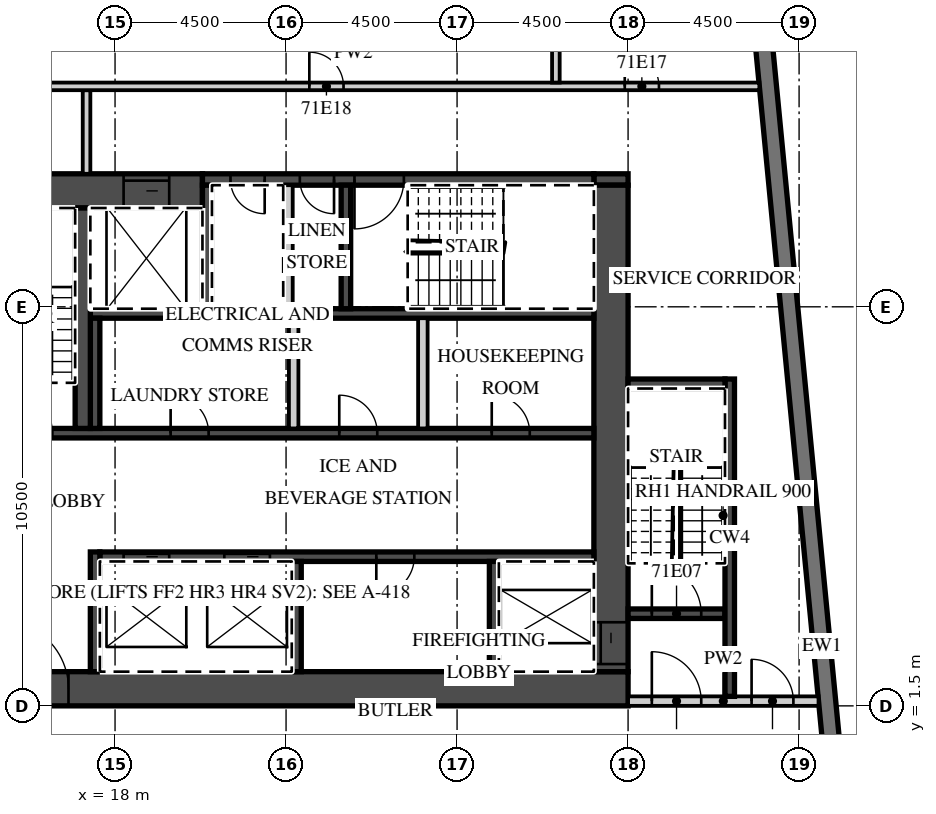
"""IFC4 building model, lengths in metres.
Left out: names, types, materials, properties, quantities, classifications, styles, units other than length and angle.
Written with IfcOpenShell. Run it as: python <this file> out.ifc"""

import sys

from ifc_helpers import new_model, si_unit, direction, frame, frame_2d, origin, place, context, subcontext, project, spatial, rectangle, extrude, element, fill, save


model = new_model("IFC4")
c1 = context("Model", 3, precision=1e-05, world=origin(), true_north=direction((0.0, 1.0)))
c2 = subcontext(c1, "Body", "Model", "MODEL_VIEW")
j1 = project(units=[si_unit("LENGTHUNIT", "METRE"), si_unit("PLANEANGLEUNIT", "RADIAN")], contexts=[c1])
p1 = place(None, origin())
s1 = spatial("IfcSite", under=j1, at=p1, CompositionType="ELEMENT")
p2 = place(p1, origin())
s2 = spatial("IfcBuilding", under=s1, at=p2, CompositionType="ELEMENT")
p3 = place(p2, frame((0.0, 0.0, 285.0)))
s3 = spatial("IfcBuildingStorey", under=s2, at=p3, CompositionType="ELEMENT", Elevation=285.0)
p4 = place(p3, frame((38.132, -12.858, 0.0), z_axis=(0.0, 0.0, 1.0), x_axis=(-0.095847749461, 0.995396006082, 0.0)))
e1 = element("IfcWall", 1, at=p4, inside=s3, PredefinedType="SOLIDWALL", context=c2, shape_type="SweptSolid", body=[
    extrude(rectangle(XDim=32.0, YDim=0.45, at=frame_2d((16.0, 0.0))), origin(), (0.0, 0.0, 1.0), 3.02),
])
p5 = place(p3, frame((13.5, 1.95, 0.0), z_axis=(0.0, 0.0, 1.0), x_axis=(1.0, 0.0, 0.0)))
e2 = element("IfcWall", 2, at=p5, inside=s3, PredefinedType="SHEAR", context=c2, shape_type="SweptSolid", body=[
    extrude(rectangle(XDim=18.0, YDim=0.9, at=frame_2d((9.0, 0.0))), origin(), (0.0, 0.0, 1.0), 3.02),
])
p6 = place(p5, frame((1.475, 0.0, 0.0)))
e3 = element("IfcOpeningElement", 3, at=p6, cuts=e2, PredefinedType="OPENING", context=c2, shape_type="SweptSolid", body=[
    extrude(rectangle(XDim=1.8, YDim=2.1, at=frame_2d((0.9, 1.05))), frame((0.0, 0.46, 0.0), z_axis=(0.0, -1.0, 0.0), x_axis=(1.0, 0.0, 0.0)), (0.0, 0.0, 1.0), 0.92),
])
p7 = place(p3, frame((13.5, 15.05, 0.0), z_axis=(0.0, 0.0, 1.0), x_axis=(1.0, 0.0, 0.0)))
e4 = element("IfcWall", 4, at=p7, inside=s3, PredefinedType="SHEAR", context=c2, shape_type="SweptSolid", body=[
    extrude(rectangle(XDim=6.8, YDim=0.9, at=frame_2d((3.4, 0.0))), origin(), (0.0, 0.0, 1.0), 3.02),
])
p8 = place(p7, frame((4.725, 0.0, 0.0)))
e5 = element("IfcOpeningElement", 5, at=p8, cuts=e4, PredefinedType="OPENING", context=c2, shape_type="SweptSolid", body=[
    extrude(rectangle(XDim=1.2, YDim=2.1, at=frame_2d((0.6, 1.05))), frame((0.0, 0.46, 0.0), z_axis=(0.0, -1.0, 0.0), x_axis=(1.0, 0.0, 0.0)), (0.0, 0.0, 1.0), 0.92),
])
p9 = place(p3, frame((30.6, 15.35, 0.0), z_axis=(0.0, 0.0, 1.0), x_axis=(1.0, 0.0, 0.0)))
e6 = element("IfcWall", 6, at=p9, inside=s3, PredefinedType="SHEAR", context=c2, shape_type="SweptSolid", body=[
    extrude(rectangle(XDim=0.9, YDim=0.3, at=frame_2d((0.45, 0.0))), origin(), (0.0, 0.0, 1.0), 3.02),
])
p10 = place(p3, frame((20.3, 15.35, 0.0), z_axis=(0.0, 0.0, 1.0), x_axis=(1.0, 0.0, 0.0)))
e7 = element("IfcWall", 7, at=p10, inside=s3, PredefinedType="SHEAR", context=c2, shape_type="SweptSolid", body=[
    extrude(rectangle(XDim=10.3, YDim=0.3, at=frame_2d((5.15, 0.0))), origin(), (0.0, 0.0, 1.0), 3.02),
])
p11 = place(p10, frame((4.0, 0.0, 0.0)))
e8 = element("IfcOpeningElement", 8, at=p11, cuts=e7, PredefinedType="OPENING", context=c2, shape_type="SweptSolid", body=[
    extrude(rectangle(XDim=1.3, YDim=2.1, at=frame_2d((0.65, 1.05))), frame((0.0, 0.16, 0.0), z_axis=(0.0, -1.0, 0.0), x_axis=(1.0, 0.0, 0.0)), (0.0, 0.0, 1.0), 0.32),
])
p12 = place(p10, frame((2.562, 0.0, 0.0)))
e9 = element("IfcOpeningElement", 9, at=p12, cuts=e7, PredefinedType="OPENING", context=c2, shape_type="SweptSolid", body=[
    extrude(rectangle(XDim=0.9, YDim=2.1, at=frame_2d((0.45, 1.05))), frame((0.0, 0.16, 0.0), z_axis=(0.0, -1.0, 0.0), x_axis=(1.0, 0.0, 0.0)), (0.0, 0.0, 1.0), 0.32),
])
p13 = place(p10, frame((0.738, 0.0, 0.0)))
e10 = element("IfcOpeningElement", 10, at=p13, cuts=e7, PredefinedType="OPENING", context=c2, shape_type="SweptSolid", body=[
    extrude(rectangle(XDim=0.9, YDim=2.1, at=frame_2d((0.45, 1.05))), frame((0.0, 0.16, 0.0), z_axis=(0.0, -1.0, 0.0), x_axis=(1.0, 0.0, 0.0)), (0.0, 0.0, 1.0), 0.32),
])
p14 = place(p3, frame((31.05, 2.4, 0.0), z_axis=(0.0, 0.0, 1.0), x_axis=(0.0, 1.0, 0.0)))
e11 = element("IfcWall", 11, at=p14, inside=s3, PredefinedType="SHEAR", context=c2, shape_type="SweptSolid", body=[
    extrude(rectangle(XDim=12.8, YDim=0.9, at=frame_2d((6.4, 0.0))), origin(), (0.0, 0.0, 1.0), 3.02),
])
p15 = place(p14, frame((0.2, 0.0, 0.0)))
e12 = element("IfcOpeningElement", 12, at=p15, cuts=e11, PredefinedType="OPENING", context=c2, shape_type="SweptSolid", body=[
    extrude(rectangle(XDim=1.1, YDim=2.1, at=frame_2d((0.55, 1.05))), frame((0.0, 0.46, 0.0), z_axis=(0.0, -1.0, 0.0), x_axis=(1.0, 0.0, 0.0)), (0.0, 0.0, 1.0), 0.92),
])
p16 = place(p3, frame((17.6, 5.425, 0.0), z_axis=(0.0, 0.0, 1.0), x_axis=(1.0, 0.0, 0.0)))
e13 = element("IfcWall", 13, at=p16, inside=s3, PredefinedType="SHEAR", context=c2, shape_type="SweptSolid", body=[
    extrude(rectangle(XDim=13.0, YDim=0.25, at=frame_2d((6.5, 0.0))), origin(), (0.0, 0.0, 1.0), 3.02),
])
p17 = place(p16, frame((3.275, 0.0, 0.0)))
e14 = element("IfcOpeningElement", 14, at=p17, cuts=e13, PredefinedType="OPENING", context=c2, shape_type="SweptSolid", body=[
    extrude(rectangle(XDim=1.2, YDim=2.1, at=frame_2d((0.6, 1.05))), frame((0.0, 0.135, 0.0), z_axis=(0.0, -1.0, 0.0), x_axis=(1.0, 0.0, 0.0)), (0.0, 0.0, 1.0), 0.27),
])
p18 = place(p16, frame((0.625, 0.0, 0.0)))
e15 = element("IfcOpeningElement", 15, at=p18, cuts=e13, PredefinedType="OPENING", context=c2, shape_type="SweptSolid", body=[
    extrude(rectangle(XDim=1.2, YDim=2.1, at=frame_2d((0.6, 1.05))), frame((0.0, 0.135, 0.0), z_axis=(0.0, -1.0, 0.0), x_axis=(1.0, 0.0, 0.0)), (0.0, 0.0, 1.0), 0.27),
])
p19 = place(p16, frame((7.275, 0.0, 0.0)))
e16 = element("IfcOpeningElement", 16, at=p19, cuts=e13, PredefinedType="OPENING", context=c2, shape_type="SweptSolid", body=[
    extrude(rectangle(XDim=1.0, YDim=2.1, at=frame_2d((0.5, 1.05))), frame((0.0, 0.135, 0.0), z_axis=(0.0, -1.0, 0.0), x_axis=(1.0, 0.0, 0.0)), (0.0, 0.0, 1.0), 0.27),
])
p20 = place(p3, frame((17.475, 2.4, 0.0), z_axis=(0.0, 0.0, 1.0), x_axis=(0.0, 1.0, 0.0)))
e17 = element("IfcWall", 17, at=p20, inside=s3, PredefinedType="SHEAR", context=c2, shape_type="SweptSolid", body=[
    extrude(rectangle(XDim=3.15, YDim=0.25, at=frame_2d((1.575, 0.0))), origin(), (0.0, 0.0, 1.0), 3.02),
])
for number, where, z_axis, x_axis in (
    (18, (27.975, 2.4, 0.0), (0.0, 0.0, 1.0), (0.0, 1.0, 0.0)),
    (19, (22.775, 2.4, 0.0), (0.0, 0.0, 1.0), (0.0, 1.0, 0.0)),
):
    element("IfcWall", number, at=place(p3, frame(where, z_axis=z_axis, x_axis=x_axis)), inside=s3, PredefinedType="SHEAR", context=c2, shape_type="SweptSolid", body=[
        extrude(rectangle(XDim=2.9, YDim=0.25, at=frame_2d((1.45, 0.0))), origin(), (0.0, 0.0, 1.0), 3.02),
    ])
p21 = place(p3, frame((14.4, 8.675, 0.0), z_axis=(0.0, 0.0, 1.0), x_axis=(1.0, 0.0, 0.0)))
e20 = element("IfcWall", 20, at=p21, inside=s3, PredefinedType="SHEAR", context=c2, shape_type="SweptSolid", body=[
    extrude(rectangle(XDim=16.2, YDim=0.25, at=frame_2d((8.1, 0.0))), origin(), (0.0, 0.0, 1.0), 3.02),
])
p22 = place(p21, frame((0.65, 0.0, 0.0)))
e21 = element("IfcOpeningElement", 21, at=p22, cuts=e20, PredefinedType="OPENING", context=c2, shape_type="SweptSolid", body=[
    extrude(rectangle(XDim=1.3, YDim=2.1, at=frame_2d((0.65, 1.05))), frame((0.0, 0.135, 0.0), z_axis=(0.0, -1.0, 0.0), x_axis=(1.0, 0.0, 0.0)), (0.0, 0.0, 1.0), 0.27),
])
p23 = place(p21, frame((13.512, 0.0, 0.0)))
e22 = element("IfcOpeningElement", 22, at=p23, cuts=e20, PredefinedType="OPENING", context=c2, shape_type="SweptSolid", body=[
    extrude(rectangle(XDim=1.0, YDim=2.1, at=frame_2d((0.5, 1.05))), frame((0.0, 0.135, 0.0), z_axis=(0.0, -1.0, 0.0), x_axis=(1.0, 0.0, 0.0)), (0.0, 0.0, 1.0), 0.27),
])
p24 = place(p21, frame((9.5, 0.0, 0.0)))
e23 = element("IfcOpeningElement", 23, at=p24, cuts=e20, PredefinedType="OPENING", context=c2, shape_type="SweptSolid", body=[
    extrude(rectangle(XDim=1.0, YDim=2.1, at=frame_2d((0.5, 1.05))), frame((0.0, 0.135, 0.0), z_axis=(0.0, -1.0, 0.0), x_axis=(1.0, 0.0, 0.0)), (0.0, 0.0, 1.0), 0.27),
])
p25 = place(p21, frame((5.062, 0.0, 0.0)))
e24 = element("IfcOpeningElement", 24, at=p25, cuts=e20, PredefinedType="OPENING", context=c2, shape_type="SweptSolid", body=[
    extrude(rectangle(XDim=1.0, YDim=2.1, at=frame_2d((0.5, 1.05))), frame((0.0, 0.135, 0.0), z_axis=(0.0, -1.0, 0.0), x_axis=(1.0, 0.0, 0.0)), (0.0, 0.0, 1.0), 0.27),
])
p26 = place(p3, frame((17.35, 11.825, 0.0), z_axis=(0.0, 0.0, 1.0), x_axis=(1.0, 0.0, 0.0)))
e25 = element("IfcWall", 25, at=p26, inside=s3, PredefinedType="SHEAR", context=c2, shape_type="SweptSolid", body=[
    extrude(rectangle(XDim=13.25, YDim=0.25, at=frame_2d((6.625, 0.0))), origin(), (0.0, 0.0, 1.0), 3.02),
])
p27 = place(p3, frame((17.475, 8.8, 0.0), z_axis=(0.0, 0.0, 1.0), x_axis=(0.0, 1.0, 0.0)))
e26 = element("IfcWall", 26, at=p27, inside=s3, PredefinedType="SHEAR", context=c2, shape_type="SweptSolid", body=[
    extrude(rectangle(XDim=2.9, YDim=0.25, at=frame_2d((1.45, 0.0))), origin(), (0.0, 0.0, 1.0), 3.02),
])
for number, where, z_axis, x_axis in (
    (27, (26.1, 8.8, 0.0), (0.0, 0.0, 1.0), (0.0, 1.0, 0.0)),
    (28, (22.7, 8.8, 0.0), (0.0, 0.0, 1.0), (0.0, 1.0, 0.0)),
):
    element("IfcWall", number, at=place(p3, frame(where, z_axis=z_axis, x_axis=x_axis)), inside=s3, PredefinedType="PARTITIONING", context=c2, shape_type="SweptSolid", body=[
        extrude(rectangle(XDim=2.9, YDim=0.25, at=frame_2d((1.45, 0.0))), origin(), (0.0, 0.0, 1.0), 3.02),
    ])
p28 = place(p3, frame((17.15, 8.8, 0.0), z_axis=(0.0, 0.0, 1.0), x_axis=(0.0, 1.0, 0.0)))
e29 = element("IfcWall", 29, at=p28, inside=s3, PredefinedType="SHEAR", context=c2, shape_type="SweptSolid", body=[
    extrude(rectangle(XDim=5.8, YDim=0.4, at=frame_2d((2.9, 0.0))), origin(), (0.0, 0.0, 1.0), 3.02),
])
for number, where, z_axis, x_axis in (
    (30, (20.425, 11.95, 0.0), (0.0, 0.0, 1.0), (0.0, 1.0, 0.0)),
    (31, (24.075, 11.95, 0.0), (0.0, 0.0, 1.0), (0.0, 1.0, 0.0)),
):
    element("IfcWall", number, at=place(p3, frame(where, z_axis=z_axis, x_axis=x_axis)), inside=s3, PredefinedType="SHEAR", context=c2, shape_type="SweptSolid", body=[
        extrude(rectangle(XDim=3.25, YDim=0.25, at=frame_2d((1.625, 0.0))), origin(), (0.0, 0.0, 1.0), 3.02),
    ])
p29 = place(p3, frame((22.55, 11.95, 0.0), z_axis=(0.0, 0.0, 1.0), x_axis=(0.0, 1.0, 0.0)))
e32 = element("IfcWall", 32, at=p29, inside=s3, PredefinedType="PARTITIONING", context=c2, shape_type="SweptSolid", body=[
    extrude(rectangle(XDim=3.25, YDim=0.25, at=frame_2d((1.625, 0.0))), origin(), (0.0, 0.0, 1.0), 3.02),
])
p30 = place(p3, frame((31.5, 1.625, 0.0), z_axis=(0.0, 0.0, 1.0), x_axis=(1.0, 0.0, 0.0)))
e33 = element("IfcWall", 33, at=p30, inside=s3, PredefinedType="PARTITIONING", context=c2, shape_type="SweptSolid", body=[
    extrude(rectangle(XDim=5.012, YDim=0.25, at=frame_2d((2.506, 0.0))), origin(), (0.0, 0.0, 1.0), 3.02),
])
p31 = place(p30, frame((0.625, 0.0, 0.0)))
e34 = element("IfcOpeningElement", 34, at=p31, cuts=e33, PredefinedType="OPENING", context=c2, shape_type="SweptSolid", body=[
    extrude(rectangle(XDim=1.3, YDim=2.1, at=frame_2d((0.65, 1.05))), frame((0.0, 0.135, 0.0), z_axis=(0.0, -1.0, 0.0), x_axis=(1.0, 0.0, 0.0)), (0.0, 0.0, 1.0), 0.27),
])
p32 = place(p30, frame((3.25, 0.0, 0.0)))
e35 = element("IfcOpeningElement", 35, at=p32, cuts=e33, PredefinedType="OPENING", context=c2, shape_type="SweptSolid", body=[
    extrude(rectangle(XDim=1.1, YDim=2.1, at=frame_2d((0.55, 1.05))), frame((0.0, 0.135, 0.0), z_axis=(0.0, -1.0, 0.0), x_axis=(1.0, 0.0, 0.0)), (0.0, 0.0, 1.0), 0.27),
])
p33 = place(p3, frame((31.5, 3.925, 0.0), z_axis=(0.0, 0.0, 1.0), x_axis=(1.0, 0.0, 0.0)))
e36 = element("IfcWall", 36, at=p33, inside=s3, PredefinedType="SHEAR", context=c2, shape_type="SweptSolid", body=[
    extrude(rectangle(XDim=2.55, YDim=0.25, at=frame_2d((1.275, 0.0))), origin(), (0.0, 0.0, 1.0), 3.02),
])
p34 = place(p33, frame((0.625, 0.0, 0.0)))
e37 = element("IfcOpeningElement", 37, at=p34, cuts=e36, PredefinedType="OPENING", context=c2, shape_type="SweptSolid", body=[
    extrude(rectangle(XDim=1.3, YDim=2.1, at=frame_2d((0.65, 1.05))), frame((0.0, 0.135, 0.0), z_axis=(0.0, -1.0, 0.0), x_axis=(1.0, 0.0, 0.0)), (0.0, 0.0, 1.0), 0.27),
])
p35 = place(p3, frame((34.175, 1.75, 0.0), z_axis=(0.0, 0.0, 1.0), x_axis=(0.0, 1.0, 0.0)))
e38 = element("IfcWall", 38, at=p35, inside=s3, PredefinedType="SHEAR", context=c2, shape_type="SweptSolid", body=[
    extrude(rectangle(XDim=8.35, YDim=0.25, at=frame_2d((4.175, 0.0))), origin(), (0.0, 0.0, 1.0), 3.02),
])
p36 = place(p3, frame((31.5, 9.975, 0.0), z_axis=(0.0, 0.0, 1.0), x_axis=(1.0, 0.0, 0.0)))
e39 = element("IfcWall", 39, at=p36, inside=s3, PredefinedType="SHEAR", context=c2, shape_type="SweptSolid", body=[
    extrude(rectangle(XDim=2.55, YDim=0.25, at=frame_2d((1.275, 0.0))), origin(), (0.0, 0.0, 1.0), 3.02),
])
p37 = place(p3, frame((17.25, 15.5, 0.0), z_axis=(0.0, 0.0, 1.0), x_axis=(0.0, 1.0, 0.0)))
e40 = element("IfcWall", 40, at=p37, inside=s3, PredefinedType="PARTITIONING", context=c2, shape_type="SweptSolid", body=[
    extrude(rectangle(XDim=2.2, YDim=0.2, at=frame_2d((1.1, 0.0))), origin(), (0.0, 0.0, 1.0), 3.02),
])
p38 = place(p3, frame((13.6, 17.8, 0.0), z_axis=(0.0, 0.0, 1.0), x_axis=(1.0, 0.0, 0.0)))
e41 = element("IfcWall", 41, at=p38, inside=s3, PredefinedType="PARTITIONING", context=c2, shape_type="SweptSolid", body=[
    extrude(rectangle(XDim=21.354, YDim=0.2, at=frame_2d((10.677, 0.0))), origin(), (0.0, 0.0, 1.0), 3.02),
])
p39 = place(p38, frame((17.812, 0.0, 0.0)))
e42 = element("IfcOpeningElement", 42, at=p39, cuts=e41, PredefinedType="OPENING", context=c2, shape_type="SweptSolid", body=[
    extrude(rectangle(XDim=0.9, YDim=2.1, at=frame_2d((0.45, 1.05))), frame((0.0, 0.11, 0.0), z_axis=(0.0, -1.0, 0.0), x_axis=(1.0, 0.0, 0.0)), (0.0, 0.0, 1.0), 0.22),
])
p40 = place(p38, frame((9.512, 0.0, 0.0)))
e43 = element("IfcOpeningElement", 43, at=p40, cuts=e41, PredefinedType="OPENING", context=c2, shape_type="SweptSolid", body=[
    extrude(rectangle(XDim=0.9, YDim=2.1, at=frame_2d((0.45, 1.05))), frame((0.0, 0.11, 0.0), z_axis=(0.0, -1.0, 0.0), x_axis=(1.0, 0.0, 0.0)), (0.0, 0.0, 1.0), 0.22),
])
p41 = place(p3, frame((29.6, 17.9, 0.0), z_axis=(0.0, 0.0, 1.0), x_axis=(0.0, 1.0, 0.0)))
e44 = element("IfcWall", 44, at=p41, inside=s3, PredefinedType="PARTITIONING", context=c2, shape_type="SweptSolid", body=[
    extrude(rectangle(XDim=4.136, YDim=0.2, at=frame_2d((2.068, 0.0))), origin(), (0.0, 0.0, 1.0), 3.02),
])
p42 = place(p17, origin())
e45 = element("IfcDoor", 45, at=p42, inside=s3, OperationType="SLIDING_TO_RIGHT", PredefinedType="DOOR", context=c2, shape_type="SweptSolid", body=[
    extrude(rectangle(XDim=1.2, YDim=2.1, at=frame_2d((0.6, 1.05))), frame((0.0, 0.025, 0.0), z_axis=(0.0, -1.0, 0.0), x_axis=(1.0, 0.0, 0.0)), (0.0, 0.0, 1.0), 0.05),
])
fill(e14, e45)
p43 = place(p18, origin())
e46 = element("IfcDoor", 46, at=p43, inside=s3, OperationType="SLIDING_TO_LEFT", PredefinedType="DOOR", context=c2, shape_type="SweptSolid", body=[
    extrude(rectangle(XDim=1.2, YDim=2.1, at=frame_2d((0.6, 1.05))), frame((0.0, 0.025, 0.0), z_axis=(0.0, -1.0, 0.0), x_axis=(1.0, 0.0, 0.0)), (0.0, 0.0, 1.0), 0.05),
])
fill(e15, e46)
p44 = place(p8, origin())
e47 = element("IfcDoor", 47, at=p44, inside=s3, OperationType="SLIDING_TO_LEFT", PredefinedType="DOOR", context=c2, shape_type="SweptSolid", body=[
    extrude(rectangle(XDim=1.2, YDim=2.1, at=frame_2d((0.6, 1.05))), frame((0.0, 0.025, 0.0), z_axis=(0.0, -1.0, 0.0), x_axis=(1.0, 0.0, 0.0)), (0.0, 0.0, 1.0), 0.05),
])
fill(e5, e47)
p45 = place(p15, origin())
e48 = element("IfcDoor", 48, at=p45, inside=s3, OperationType="SLIDING_TO_LEFT", PredefinedType="DOOR", context=c2, shape_type="SweptSolid", body=[
    extrude(rectangle(XDim=1.1, YDim=2.1, at=frame_2d((0.55, 1.05))), frame((0.0, 0.025, 0.0), z_axis=(0.0, -1.0, 0.0), x_axis=(1.0, 0.0, 0.0)), (0.0, 0.0, 1.0), 0.05),
])
fill(e12, e48)
p46 = place(p6, origin())
e49 = element("IfcDoor", 49, at=p46, inside=s3, OperationType="DOUBLE_DOOR_DOUBLE_SWING", PredefinedType="DOOR", context=c2, shape_type="SweptSolid", body=[
    extrude(rectangle(XDim=1.8, YDim=2.1, at=frame_2d((0.9, 1.05))), frame((0.0, 0.025, 0.0), z_axis=(0.0, -1.0, 0.0), x_axis=(1.0, 0.0, 0.0)), (0.0, 0.0, 1.0), 0.05),
])
fill(e3, e49)
p47 = place(p31, origin())
e50 = element("IfcDoor", 50, at=p47, inside=s3, OperationType="SINGLE_SWING_LEFT", PredefinedType="DOOR", context=c2, shape_type="SweptSolid", body=[
    extrude(rectangle(XDim=1.3, YDim=2.1, at=frame_2d((0.65, 1.05))), frame((0.0, 0.025, 0.0), z_axis=(0.0, -1.0, 0.0), x_axis=(1.0, 0.0, 0.0)), (0.0, 0.0, 1.0), 0.05),
])
fill(e34, e50)
p48 = place(p34, origin())
e51 = element("IfcDoor", 51, at=p48, inside=s3, OperationType="SINGLE_SWING_LEFT", PredefinedType="DOOR", context=c2, shape_type="SweptSolid", body=[
    extrude(rectangle(XDim=1.3, YDim=2.1, at=frame_2d((0.65, 1.05))), frame((0.0, 0.025, 0.0), z_axis=(0.0, -1.0, 0.0), x_axis=(1.0, 0.0, 0.0)), (0.0, 0.0, 1.0), 0.05),
])
fill(e37, e51)
p49 = place(p32, origin())
e52 = element("IfcDoor", 52, at=p49, inside=s3, OperationType="SINGLE_SWING_LEFT", PredefinedType="DOOR", context=c2, shape_type="SweptSolid", body=[
    extrude(rectangle(XDim=1.1, YDim=2.1, at=frame_2d((0.55, 1.05))), frame((0.0, 0.025, 0.0), z_axis=(0.0, -1.0, 0.0), x_axis=(1.0, 0.0, 0.0)), (0.0, 0.0, 1.0), 0.05),
])
fill(e35, e52)
p50 = place(p11, origin())
e53 = element("IfcDoor", 53, at=p50, inside=s3, OperationType="SINGLE_SWING_LEFT", PredefinedType="DOOR", context=c2, shape_type="SweptSolid", body=[
    extrude(rectangle(XDim=1.3, YDim=2.1, at=frame_2d((0.65, 1.05))), frame((0.0, 0.025, 0.0), z_axis=(0.0, -1.0, 0.0), x_axis=(1.0, 0.0, 0.0)), (0.0, 0.0, 1.0), 0.05),
])
fill(e8, e53)
p51 = place(p12, origin())
e54 = element("IfcDoor", 54, at=p51, inside=s3, OperationType="SINGLE_SWING_RIGHT", PredefinedType="DOOR", context=c2, shape_type="SweptSolid", body=[
    extrude(rectangle(XDim=0.9, YDim=2.1, at=frame_2d((0.45, 1.05))), frame((0.0, 0.025, 0.0), z_axis=(0.0, -1.0, 0.0), x_axis=(1.0, 0.0, 0.0)), (0.0, 0.0, 1.0), 0.05),
])
fill(e9, e54)
p52 = place(p13, origin())
e55 = element("IfcDoor", 55, at=p52, inside=s3, OperationType="SINGLE_SWING_RIGHT", PredefinedType="DOOR", context=c2, shape_type="SweptSolid", body=[
    extrude(rectangle(XDim=0.9, YDim=2.1, at=frame_2d((0.45, 1.05))), frame((0.0, 0.025, 0.0), z_axis=(0.0, -1.0, 0.0), x_axis=(1.0, 0.0, 0.0)), (0.0, 0.0, 1.0), 0.05),
])
fill(e10, e55)
p53 = place(p23, origin())
e56 = element("IfcDoor", 56, at=p53, inside=s3, OperationType="SINGLE_SWING_LEFT", PredefinedType="DOOR", context=c2, shape_type="SweptSolid", body=[
    extrude(rectangle(XDim=1.0, YDim=2.1, at=frame_2d((0.5, 1.05))), frame((0.0, 0.025, 0.0), z_axis=(0.0, -1.0, 0.0), x_axis=(1.0, 0.0, 0.0)), (0.0, 0.0, 1.0), 0.05),
])
fill(e22, e56)
p54 = place(p24, origin())
e57 = element("IfcDoor", 57, at=p54, inside=s3, OperationType="SINGLE_SWING_LEFT", PredefinedType="DOOR", context=c2, shape_type="SweptSolid", body=[
    extrude(rectangle(XDim=1.0, YDim=2.1, at=frame_2d((0.5, 1.05))), frame((0.0, 0.025, 0.0), z_axis=(0.0, -1.0, 0.0), x_axis=(1.0, 0.0, 0.0)), (0.0, 0.0, 1.0), 0.05),
])
fill(e23, e57)
p55 = place(p25, origin())
e58 = element("IfcDoor", 58, at=p55, inside=s3, OperationType="SINGLE_SWING_LEFT", PredefinedType="DOOR", context=c2, shape_type="SweptSolid", body=[
    extrude(rectangle(XDim=1.0, YDim=2.1, at=frame_2d((0.5, 1.05))), frame((0.0, 0.025, 0.0), z_axis=(0.0, -1.0, 0.0), x_axis=(1.0, 0.0, 0.0)), (0.0, 0.0, 1.0), 0.05),
])
fill(e24, e58)
p56 = place(p19, origin())
e59 = element("IfcDoor", 59, at=p56, inside=s3, OperationType="SINGLE_SWING_LEFT", PredefinedType="DOOR", context=c2, shape_type="SweptSolid", body=[
    extrude(rectangle(XDim=1.0, YDim=2.1, at=frame_2d((0.5, 1.05))), frame((0.0, 0.025, 0.0), z_axis=(0.0, -1.0, 0.0), x_axis=(1.0, 0.0, 0.0)), (0.0, 0.0, 1.0), 0.05),
])
fill(e16, e59)
p57 = place(p39, origin())
e60 = element("IfcDoor", 60, at=p57, inside=s3, OperationType="SINGLE_SWING_LEFT", PredefinedType="DOOR", context=c2, shape_type="SweptSolid", body=[
    extrude(rectangle(XDim=0.9, YDim=2.1, at=frame_2d((0.45, 1.05))), frame((0.0, 0.025, 0.0), z_axis=(0.0, -1.0, 0.0), x_axis=(1.0, 0.0, 0.0)), (0.0, 0.0, 1.0), 0.05),
])
fill(e42, e60)
p58 = place(p40, origin())
e61 = element("IfcDoor", 61, at=p58, inside=s3, OperationType="SINGLE_SWING_LEFT", PredefinedType="DOOR", context=c2, shape_type="SweptSolid", body=[
    extrude(rectangle(XDim=0.9, YDim=2.1, at=frame_2d((0.45, 1.05))), frame((0.0, 0.025, 0.0), z_axis=(0.0, -1.0, 0.0), x_axis=(1.0, 0.0, 0.0)), (0.0, 0.0, 1.0), 0.05),
])
fill(e43, e61)
save(model, sys.argv[1])
